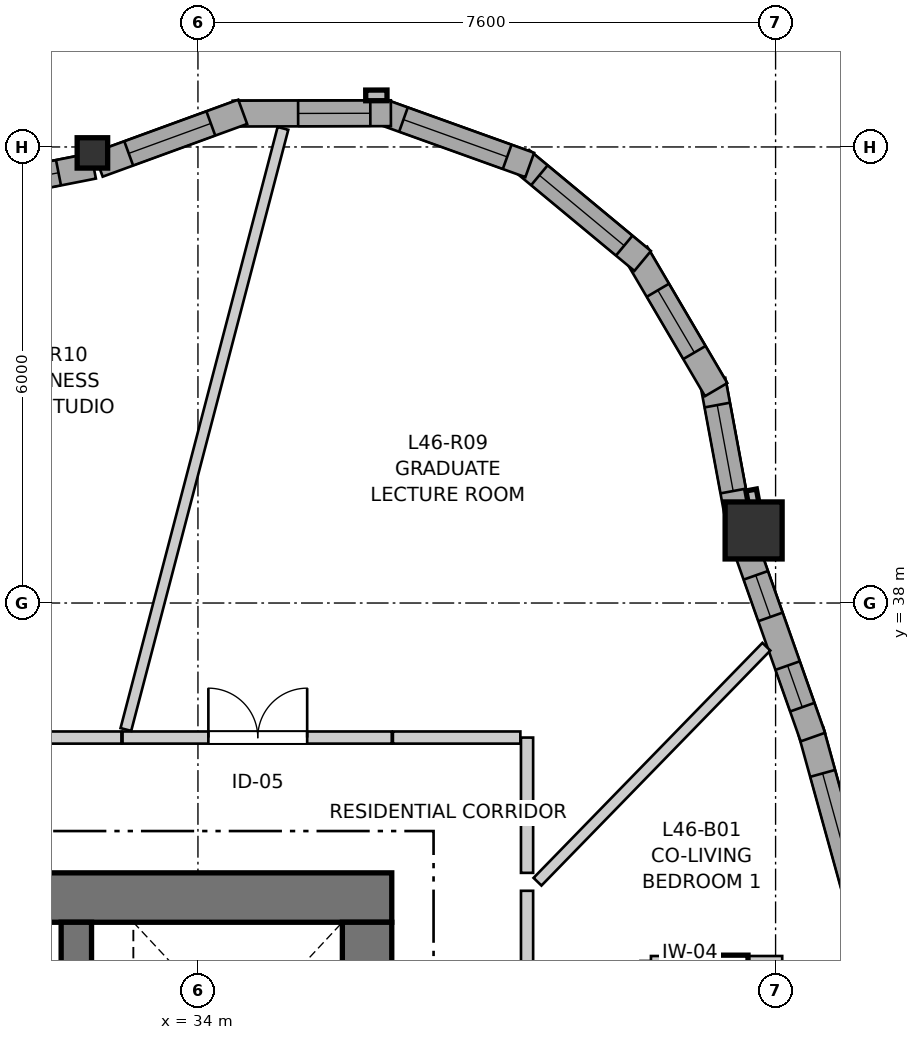
"""IFC4 building model, lengths in metres.
Left out: names, types, materials, properties, quantities, classifications, styles, units other than length and angle.
Written with IfcOpenShell. Run it as: python <this file> out.ifc"""

import sys

from ifc_helpers import new_model, si_unit, direction, frame, frame_2d, origin, origin_2d, place, context, subcontext, project, spatial, rectangle, i_section, extrude, source, transform, mapped, element, fill, save


model = new_model("IFC4")
c1 = context("Model", 3, precision=1e-05, world=origin(), true_north=direction((0.0, 1.0)))
c2 = subcontext(c1, "Body", "Model", "MODEL_VIEW")
j1 = project(units=[si_unit("LENGTHUNIT", "METRE"), si_unit("PLANEANGLEUNIT", "RADIAN")], contexts=[c1])
p1 = place(None, origin())
s1 = spatial("IfcSite", under=j1, at=p1, CompositionType="ELEMENT")
p2 = place(p1, origin())
s2 = spatial("IfcBuilding", under=s1, at=p2, CompositionType="ELEMENT")
p3 = place(p2, frame((0.0, 0.0, 155.4)))
s3 = spatial("IfcBuildingStorey", under=s2, at=p3, CompositionType="ELEMENT", Elevation=155.4)
p4 = place(p3, frame((36.55, 34.125, 0.0), z_axis=(0.0, 0.0, 1.0), x_axis=(-1.0, 0.0, 0.0)))
e1 = element("IfcWall", 1, at=p4, inside=s3, PredefinedType="SHEAR", context=c2, shape_type="SweptSolid", body=[
    extrude(rectangle(XDim=12.4, YDim=0.65, at=frame_2d((6.2, 0.0))), origin(), (0.0, 0.0, 1.0), 2.935),
])
p5 = place(p3, frame((36.225, 18.2, 0.0), z_axis=(0.0, 0.0, 1.0), x_axis=(0.0, 1.0, 0.0)))
e2 = element("IfcWall", 2, at=p5, inside=s3, PredefinedType="SHEAR", context=c2, shape_type="SweptSolid", body=[
    extrude(rectangle(XDim=15.6, YDim=0.65, at=frame_2d((7.8, 0.0))), origin(), (0.0, 0.0, 1.0), 2.935),
])
p6 = place(p5, frame((4.25, 0.0, 0.0)))
e3 = element("IfcOpeningElement", 3, at=p6, cuts=e2, PredefinedType="OPENING", context=c2, shape_type="SweptSolid", body=[
    extrude(rectangle(XDim=1.1, YDim=2.15, at=frame_2d((0.55, 1.075))), frame((0.0, 0.335, 0.0), z_axis=(0.0, -1.0, 0.0), x_axis=(1.0, 0.0, 0.0)), (0.0, 0.0, 1.0), 0.67),
])
p7 = place(p5, frame((10.25, 0.0, 0.0)))
e4 = element("IfcOpeningElement", 4, at=p7, cuts=e2, PredefinedType="OPENING", context=c2, shape_type="SweptSolid", body=[
    extrude(rectangle(XDim=1.1, YDim=2.15, at=frame_2d((0.55, 1.075))), frame((0.0, 0.335, 0.0), z_axis=(0.0, -1.0, 0.0), x_axis=(1.0, 0.0, 0.0)), (0.0, 0.0, 1.0), 0.67),
])
p8 = place(p3, frame((32.4, 30.85, 0.0), z_axis=(0.0, 0.0, 1.0), x_axis=(0.0, 1.0, 0.0)))
e5 = element("IfcWall", 5, at=p8, inside=s3, PredefinedType="SHEAR", context=c2, shape_type="SweptSolid", body=[
    extrude(rectangle(XDim=2.95, YDim=0.4, at=frame_2d((1.475, 0.0))), origin(), (0.0, 0.0, 1.0), 2.935),
])
m1 = source(origin(), c2, "Body", "SweptSolid", [
    extrude(rectangle(XDim=0.75, YDim=0.75, at=origin_2d()), origin(), (0.0, 0.0, 1.0), 2.935),
])
p9 = place(p3, frame((41.311, 38.955, 0.0), z_axis=(0.0, 0.0, 1.0), x_axis=(1.0, 0.0, 0.0)))
e6 = element("IfcColumn", 6, at=p9, inside=s3, PredefinedType="COLUMN", context=c2, shape_type="MappedRepresentation", body=[
    mapped(m1, transform((0.0, 0.0, 0.0), x_axis=(1.0, 0.0, 0.0), y_axis=(0.0, 1.0, 0.0), z_axis=(0.0, 0.0, 1.0), scale=1.0)),
])
m2 = source(origin(), c2, "Body", "SweptSolid", [
    extrude(i_section(OverallWidth=0.401, OverallDepth=0.399, WebThickness=0.023, FlangeThickness=0.036, FilletRadius=0.015, at=origin_2d()), origin(), (0.0, 0.0, 1.0), 2.935),
])
p10 = place(p3, frame((32.611, 43.922, 0.0), z_axis=(0.0, 0.0, 1.0), x_axis=(1.0, 0.0, 0.0)))
e7 = element("IfcColumn", 7, at=p10, inside=s3, PredefinedType="PILASTER", context=c2, shape_type="MappedRepresentation", body=[
    mapped(m2, transform((0.0, 0.0, 0.0), x_axis=(1.0, 0.0, 0.0), y_axis=(0.0, 1.0, 0.0), z_axis=(0.0, 0.0, 1.0), scale=1.0)),
])
p11 = place(p3, frame((42.795, 33.674, 0.0), z_axis=(0.0, 0.0, 1.0), x_axis=(-0.266404970566, 0.963861188999, 0.0)))
e8 = element("IfcWall", 8, at=p11, inside=s3, PredefinedType="SOLIDWALL", context=c2, shape_type="SweptSolid", body=[
    extrude(rectangle(XDim=2.745, YDim=0.34, at=frame_2d((1.372, 0.0))), origin(), (0.0, 0.0, 1.0), 2.515),
])
p12 = place(p11, frame((0.562, 0.0, 0.82)))
e9 = element("IfcOpeningElement", 9, at=p12, cuts=e8, PredefinedType="OPENING", context=c2, shape_type="SweptSolid", body=[
    extrude(rectangle(XDim=1.6, YDim=1.35, at=frame_2d((0.8, 0.675))), frame((0.0, 0.18, 0.0), z_axis=(0.0, -1.0, 0.0), x_axis=(1.0, 0.0, 0.0)), (0.0, 0.0, 1.0), 0.36),
])
p13 = place(p3, frame((42.09, 36.236, 0.0), z_axis=(0.0, 0.0, 1.0), x_axis=(-0.332705243691, 0.943030869495, 0.0)))
e10 = element("IfcWall", 10, at=p13, inside=s3, PredefinedType="SOLIDWALL", context=c2, shape_type="SweptSolid", body=[
    extrude(rectangle(XDim=2.668, YDim=0.34, at=frame_2d((1.334, 0.0))), origin(), (0.0, 0.0, 1.0), 2.515),
])
p14 = place(p13, frame((0.417, 0.0, 0.82)))
e11 = element("IfcOpeningElement", 11, at=p14, cuts=e10, PredefinedType="OPENING", context=c2, shape_type="SweptSolid", body=[
    extrude(rectangle(XDim=0.58, YDim=1.35, at=frame_2d((0.29, 0.675))), frame((0.0, 0.18, 0.0), z_axis=(0.0, -1.0, 0.0), x_axis=(1.0, 0.0, 0.0)), (0.0, 0.0, 1.0), 0.36),
])
p15 = place(p13, frame((1.677, 0.0, 0.82)))
e12 = element("IfcOpeningElement", 12, at=p15, cuts=e10, PredefinedType="OPENING", context=c2, shape_type="SweptSolid", body=[
    extrude(rectangle(XDim=0.58, YDim=1.35, at=frame_2d((0.29, 0.675))), frame((0.0, 0.18, 0.0), z_axis=(0.0, -1.0, 0.0), x_axis=(1.0, 0.0, 0.0)), (0.0, 0.0, 1.0), 0.36),
])
p16 = place(p3, frame((41.115, 39.076, 0.0), z_axis=(0.0, 0.0, 1.0), x_axis=(-0.182320770307, 0.983239104549, 0.0)))
e13 = element("IfcWall", 13, at=p16, inside=s3, PredefinedType="SOLIDWALL", context=c2, shape_type="SweptSolid", body=[
    extrude(rectangle(XDim=1.888, YDim=0.34, at=frame_2d((0.944, 0.0))), origin(), (0.0, 0.0, 1.0), 2.515),
])
p17 = place(p16, frame((0.404, 0.0, 0.82)))
e14 = element("IfcOpeningElement", 14, at=p17, cuts=e13, PredefinedType="OPENING", context=c2, shape_type="SweptSolid", body=[
    extrude(rectangle(XDim=1.15, YDim=1.2, at=frame_2d((0.575, 0.6))), frame((0.0, 0.18, 0.0), z_axis=(0.0, -1.0, 0.0), x_axis=(1.0, 0.0, 0.0)), (0.0, 0.0, 1.0), 0.36),
])
p18 = place(p3, frame((40.818, 40.808, 0.0), z_axis=(0.0, 0.0, 1.0), x_axis=(-0.506312473438, 0.86235009088, 0.0)))
e15 = element("IfcWall", 15, at=p18, inside=s3, PredefinedType="SOLIDWALL", context=c2, shape_type="SweptSolid", body=[
    extrude(rectangle(XDim=2.081, YDim=0.34, at=frame_2d((1.041, 0.0))), origin(), (0.0, 0.0, 1.0), 2.515),
])
p19 = place(p18, frame((0.566, 0.0, 0.82)))
e16 = element("IfcOpeningElement", 16, at=p19, cuts=e15, PredefinedType="OPENING", context=c2, shape_type="SweptSolid", body=[
    extrude(rectangle(XDim=0.95, YDim=1.35, at=frame_2d((0.475, 0.675))), frame((0.0, 0.18, 0.0), z_axis=(0.0, -1.0, 0.0), x_axis=(1.0, 0.0, 0.0)), (0.0, 0.0, 1.0), 0.36),
])
p20 = place(p3, frame((39.851, 42.5, 0.0), z_axis=(0.0, 0.0, 1.0), x_axis=(-0.769642650648, 0.638474894028, 0.0)))
e17 = element("IfcWall", 17, at=p20, inside=s3, PredefinedType="SOLIDWALL", context=c2, shape_type="SweptSolid", body=[
    extrude(rectangle(XDim=2.081, YDim=0.34, at=frame_2d((1.041, 0.0))), origin(), (0.0, 0.0, 1.0), 2.515),
])
p21 = place(p20, frame((0.315, 0.0, 0.82)))
e18 = element("IfcOpeningElement", 18, at=p21, cuts=e17, PredefinedType="OPENING", context=c2, shape_type="SweptSolid", body=[
    extrude(rectangle(XDim=1.45, YDim=1.25, at=frame_2d((0.725, 0.625))), frame((0.0, 0.18, 0.0), z_axis=(0.0, -1.0, 0.0), x_axis=(1.0, 0.0, 0.0)), (0.0, 0.0, 1.0), 0.36),
])
p22 = place(p3, frame((38.365, 43.763, 0.0), z_axis=(0.0, 0.0, 1.0), x_axis=(-0.941071215914, 0.338208466153, 0.0)))
e19 = element("IfcWall", 19, at=p22, inside=s3, PredefinedType="SOLIDWALL", context=c2, shape_type="SweptSolid", body=[
    extrude(rectangle(XDim=2.081, YDim=0.34, at=frame_2d((1.041, 0.0))), origin(), (0.0, 0.0, 1.0), 2.515),
])
p23 = place(p22, frame((0.316, 0.0, 0.82)))
e20 = element("IfcOpeningElement", 20, at=p23, cuts=e19, PredefinedType="OPENING", context=c2, shape_type="SweptSolid", body=[
    extrude(rectangle(XDim=1.45, YDim=1.25, at=frame_2d((0.725, 0.625))), frame((0.0, 0.18, 0.0), z_axis=(0.0, -1.0, 0.0), x_axis=(1.0, 0.0, 0.0)), (0.0, 0.0, 1.0), 0.36),
])
p24 = place(p3, frame((36.538, 44.444, 0.0), z_axis=(0.0, 0.0, 1.0), x_axis=(-0.999997247411, -0.002346309825, 0.0)))
e21 = element("IfcWall", 21, at=p24, inside=s3, PredefinedType="SOLIDWALL", context=c2, shape_type="SweptSolid", body=[
    extrude(rectangle(XDim=2.081, YDim=0.34, at=frame_2d((1.041, 0.0))), origin(), (0.0, 0.0, 1.0), 2.515),
])
p25 = place(p24, frame((0.271, 0.0, 0.82)))
e22 = element("IfcOpeningElement", 22, at=p25, cuts=e21, PredefinedType="OPENING", context=c2, shape_type="SweptSolid", body=[
    extrude(rectangle(XDim=0.95, YDim=1.35, at=frame_2d((0.475, 0.675))), frame((0.0, 0.18, 0.0), z_axis=(0.0, -1.0, 0.0), x_axis=(1.0, 0.0, 0.0)), (0.0, 0.0, 1.0), 0.36),
])
p26 = place(p3, frame((34.589, 44.462, 0.0), z_axis=(0.0, 0.0, 1.0), x_axis=(-0.939387553708, -0.342857148007, 0.0)))
e23 = element("IfcWall", 23, at=p26, inside=s3, PredefinedType="SOLIDWALL", context=c2, shape_type="SweptSolid", body=[
    extrude(rectangle(XDim=2.023, YDim=0.34, at=frame_2d((1.011, 0.0))), origin(), (0.0, 0.0, 1.0), 2.515),
])
p27 = place(p26, frame((0.447, 0.0, 0.82)))
e24 = element("IfcOpeningElement", 24, at=p27, cuts=e23, PredefinedType="OPENING", context=c2, shape_type="SweptSolid", body=[
    extrude(rectangle(XDim=1.15, YDim=1.2, at=frame_2d((0.575, 0.6))), frame((0.0, 0.18, 0.0), z_axis=(0.0, -1.0, 0.0), x_axis=(1.0, 0.0, 0.0)), (0.0, 0.0, 1.0), 0.36),
])
p28 = place(p3, frame((32.625, 43.751, 0.0), z_axis=(0.0, 0.0, 1.0), x_axis=(-0.981232663103, -0.192827541756, 0.0)))
e25 = element("IfcWall", 25, at=p28, inside=s3, PredefinedType="SOLIDWALL", context=c2, shape_type="SweptSolid", body=[
    extrude(rectangle(XDim=2.756, YDim=0.34, at=frame_2d((1.378, 0.0))), origin(), (0.0, 0.0, 1.0), 2.515),
])
p29 = place(p28, frame((0.468, 0.0, 0.82)))
e26 = element("IfcOpeningElement", 26, at=p29, cuts=e25, PredefinedType="OPENING", context=c2, shape_type="SweptSolid", body=[
    extrude(rectangle(XDim=1.8, YDim=1.45, at=frame_2d((0.9, 0.725))), frame((0.0, 0.18, 0.0), z_axis=(0.0, -1.0, 0.0), x_axis=(1.0, 0.0, 0.0)), (0.0, 0.0, 1.0), 0.36),
])
p30 = place(p3, frame((38.33, 34.214, 0.0), z_axis=(0.0, 0.0, 1.0), x_axis=(0.0, -1.0, 0.0)))
e27 = element("IfcWall", 27, at=p30, inside=s3, PredefinedType="PARTITIONING", context=c2, shape_type="SweptSolid", body=[
    extrude(rectangle(XDim=4.093, YDim=0.16, at=frame_2d((2.046, 0.0))), origin(), (0.0, 0.0, 1.0), 2.935),
])
p31 = place(p30, frame((1.589, 0.0, 0.0)))
e28 = element("IfcOpeningElement", 28, at=p31, cuts=e27, PredefinedType="OPENING", context=c2, shape_type="SweptSolid", body=[
    extrude(rectangle(XDim=0.92, YDim=2.1, at=frame_2d((0.46, 1.05))), frame((0.0, 0.09, 0.0), z_axis=(0.0, -1.0, 0.0), x_axis=(1.0, 0.0, 0.0)), (0.0, 0.0, 1.0), 0.18),
])
p32 = place(p3, frame((33.008, 36.23, 0.0), z_axis=(0.0, 0.0, 1.0), x_axis=(1.0, 0.0, 0.0)))
e29 = element("IfcWall", 29, at=p32, inside=s3, PredefinedType="PARTITIONING", context=c2, shape_type="SweptSolid", body=[
    extrude(rectangle(XDim=3.542, YDim=0.16, at=frame_2d((1.771, 0.0))), origin(), (0.0, 0.0, 1.0), 2.573),
])
p33 = place(p32, frame((1.129, 0.0, 0.0)))
e30 = element("IfcOpeningElement", 30, at=p33, cuts=e29, PredefinedType="OPENING", context=c2, shape_type="SweptSolid", body=[
    extrude(rectangle(XDim=1.3, YDim=2.1, at=frame_2d((0.65, 1.05))), frame((0.0, 0.09, 0.0), z_axis=(0.0, -1.0, 0.0), x_axis=(1.0, 0.0, 0.0)), (0.0, 0.0, 1.0), 0.18),
])
p34 = place(p3, frame((30.055, 36.23, 0.0), z_axis=(0.0, 0.0, 1.0), x_axis=(1.0, 0.0, 0.0)))
e31 = element("IfcWall", 31, at=p34, inside=s3, PredefinedType="PARTITIONING", context=c2, shape_type="SweptSolid", body=[
    extrude(rectangle(XDim=2.938, YDim=0.16, at=frame_2d((1.469, 0.0))), origin(), (0.0, 0.0, 1.0), 2.573),
])
p35 = place(p34, frame((0.99, 0.0, 0.0)))
e32 = element("IfcOpeningElement", 32, at=p35, cuts=e31, PredefinedType="OPENING", context=c2, shape_type="SweptSolid", body=[
    extrude(rectangle(XDim=0.96, YDim=2.1, at=frame_2d((0.48, 1.05))), frame((0.0, 0.09, 0.0), z_axis=(0.0, -1.0, 0.0), x_axis=(1.0, 0.0, 0.0)), (0.0, 0.0, 1.0), 0.18),
])
p36 = place(p3, frame((39.887, 33.291, 0.0), z_axis=(0.0, 0.0, 1.0), x_axis=(0.0, -1.0, 0.0)))
e33 = element("IfcWall", 33, at=p36, inside=s3, PredefinedType="PARTITIONING", context=c2, shape_type="SweptSolid", body=[
    extrude(rectangle(XDim=1.9, YDim=0.13, at=frame_2d((0.95, 0.0))), origin(), (0.0, 0.0, 1.0), 2.935),
])
p37 = place(p36, frame((0.51, 0.0, 0.0)))
e34 = element("IfcOpeningElement", 34, at=p37, cuts=e33, PredefinedType="OPENING", context=c2, shape_type="SweptSolid", body=[
    extrude(rectangle(XDim=0.88, YDim=2.05, at=frame_2d((0.44, 1.025))), frame((0.0, 0.075, 0.0), z_axis=(0.0, -1.0, 0.0), x_axis=(1.0, 0.0, 0.0)), (0.0, 0.0, 1.0), 0.15),
])
p38 = place(p3, frame((33.052, 36.336, 0.0), z_axis=(0.0, 0.0, 1.0), x_axis=(0.252838925964, 0.967508386277, 0.0)))
e35 = element("IfcWall", 35, at=p38, inside=s3, PredefinedType="PARTITIONING", context=c2, shape_type="SweptSolid", body=[
    extrude(rectangle(XDim=8.174, YDim=0.145, at=frame_2d((4.087, 0.0))), origin(), (0.0, 0.0, 1.0), 2.935),
])
p39 = place(p3, frame((38.468, 34.333, 0.0), z_axis=(0.0, 0.0, 1.0), x_axis=(0.697683159601, 0.71640645503, 0.0)))
e36 = element("IfcWall", 36, at=p39, inside=s3, PredefinedType="PARTITIONING", context=c2, shape_type="SweptSolid", body=[
    extrude(rectangle(XDim=4.316, YDim=0.145, at=frame_2d((2.158, 0.0))), origin(), (0.0, 0.0, 1.0), 2.935),
])
p40 = place(p3, frame((39.96, 33.291, 0.0), z_axis=(0.0, 0.0, 1.0), x_axis=(1.0, 0.0, 0.0)))
e37 = element("IfcWall", 37, at=p40, inside=s3, PredefinedType="PARTITIONING", context=c2, shape_type="SweptSolid", body=[
    extrude(rectangle(XDim=1.727, YDim=0.13, at=frame_2d((0.864, 0.0))), origin(), (0.0, 0.0, 1.0), 2.935),
])
p41 = place(p3, frame((38.33, 34.45, 0.0), z_axis=(0.0, 0.0, 1.0), x_axis=(0.0, 1.0, 0.0)))
e38 = element("IfcWall", 38, at=p41, inside=s3, PredefinedType="PARTITIONING", context=c2, shape_type="SweptSolid", body=[
    extrude(rectangle(XDim=1.78, YDim=0.16, at=frame_2d((0.89, 0.0))), origin(), (0.0, 0.0, 1.0), 2.935),
])
p42 = place(p3, frame((36.565, 36.23, 0.0), z_axis=(0.0, 0.0, 1.0), x_axis=(1.0, 0.0, 0.0)))
e39 = element("IfcWall", 39, at=p42, inside=s3, PredefinedType="PARTITIONING", context=c2, shape_type="SweptSolid", body=[
    extrude(rectangle(XDim=1.677, YDim=0.16, at=frame_2d((0.838, 0.0))), origin(), (0.0, 0.0, 1.0), 2.935),
])
m3 = source(origin(), c2, "Body", "SweptSolid", [
    extrude(rectangle(XDim=1.6, YDim=1.35, at=frame_2d((0.8, 0.675))), frame((0.0, 0.03, 0.0), z_axis=(0.0, -1.0, 0.0), x_axis=(1.0, 0.0, 0.0)), (0.0, 0.0, 1.0), 0.06),
])
p43 = place(p12, origin())
e40 = element("IfcWindow", 40, at=p43, inside=s3, PartitioningType="SINGLE_PANEL", PredefinedType="WINDOW", context=c2, shape_type="MappedRepresentation", body=[
    mapped(m3, transform((0.0, 0.0, 0.0), x_axis=(1.0, 0.0, 0.0), y_axis=(0.0, 1.0, 0.0), z_axis=(0.0, 0.0, 1.0), scale=1.0)),
])
fill(e9, e40)
m4 = source(origin(), c2, "Body", "SweptSolid", [
    extrude(rectangle(XDim=0.58, YDim=1.35, at=frame_2d((0.29, 0.675))), frame((0.0, 0.03, 0.0), z_axis=(0.0, -1.0, 0.0), x_axis=(1.0, 0.0, 0.0)), (0.0, 0.0, 1.0), 0.06),
])
p44 = place(p14, origin())
e41 = element("IfcWindow", 41, at=p44, inside=s3, PartitioningType="SINGLE_PANEL", PredefinedType="WINDOW", context=c2, shape_type="MappedRepresentation", body=[
    mapped(m4, transform((0.0, 0.0, 0.0), x_axis=(1.0, 0.0, 0.0), y_axis=(0.0, 1.0, 0.0), z_axis=(0.0, 0.0, 1.0), scale=1.0)),
])
fill(e11, e41)
p45 = place(p15, origin())
e42 = element("IfcWindow", 42, at=p45, inside=s3, PartitioningType="SINGLE_PANEL", PredefinedType="WINDOW", context=c2, shape_type="MappedRepresentation", body=[
    mapped(m4, transform((0.0, 0.0, 0.0), x_axis=(1.0, 0.0, 0.0), y_axis=(0.0, 1.0, 0.0), z_axis=(0.0, 0.0, 1.0), scale=1.0)),
])
fill(e12, e42)
m5 = source(origin(), c2, "Body", "SweptSolid", [
    extrude(rectangle(XDim=1.15, YDim=1.2, at=frame_2d((0.575, 0.6))), frame((0.0, 0.03, 0.0), z_axis=(0.0, -1.0, 0.0), x_axis=(1.0, 0.0, 0.0)), (0.0, 0.0, 1.0), 0.06),
])
p46 = place(p17, origin())
e43 = element("IfcWindow", 43, at=p46, inside=s3, PartitioningType="SINGLE_PANEL", PredefinedType="WINDOW", context=c2, shape_type="MappedRepresentation", body=[
    mapped(m5, transform((0.0, 0.0, 0.0), x_axis=(1.0, 0.0, 0.0), y_axis=(0.0, 1.0, 0.0), z_axis=(0.0, 0.0, 1.0), scale=1.0)),
])
fill(e14, e43)
m6 = source(origin(), c2, "Body", "SweptSolid", [
    extrude(rectangle(XDim=0.95, YDim=1.35, at=frame_2d((0.475, 0.675))), frame((0.0, 0.03, 0.0), z_axis=(0.0, -1.0, 0.0), x_axis=(1.0, 0.0, 0.0)), (0.0, 0.0, 1.0), 0.06),
])
p47 = place(p19, origin())
e44 = element("IfcWindow", 44, at=p47, inside=s3, PartitioningType="SINGLE_PANEL", PredefinedType="WINDOW", context=c2, shape_type="MappedRepresentation", body=[
    mapped(m6, transform((0.0, 0.0, 0.0), x_axis=(1.0, 0.0, 0.0), y_axis=(0.0, 1.0, 0.0), z_axis=(0.0, 0.0, 1.0), scale=1.0)),
])
fill(e16, e44)
m7 = source(origin(), c2, "Body", "SweptSolid", [
    extrude(rectangle(XDim=1.45, YDim=1.25, at=frame_2d((0.725, 0.625))), frame((0.0, 0.03, 0.0), z_axis=(0.0, -1.0, 0.0), x_axis=(1.0, 0.0, 0.0)), (0.0, 0.0, 1.0), 0.06),
])
p48 = place(p21, origin())
e45 = element("IfcWindow", 45, at=p48, inside=s3, PartitioningType="SINGLE_PANEL", PredefinedType="WINDOW", context=c2, shape_type="MappedRepresentation", body=[
    mapped(m7, transform((0.0, 0.0, 0.0), x_axis=(1.0, 0.0, 0.0), y_axis=(0.0, 1.0, 0.0), z_axis=(0.0, 0.0, 1.0), scale=1.0)),
])
fill(e18, e45)
p49 = place(p23, origin())
e46 = element("IfcWindow", 46, at=p49, inside=s3, PartitioningType="SINGLE_PANEL", PredefinedType="WINDOW", context=c2, shape_type="MappedRepresentation", body=[
    mapped(m7, transform((0.0, 0.0, 0.0), x_axis=(1.0, 0.0, 0.0), y_axis=(0.0, 1.0, 0.0), z_axis=(0.0, 0.0, 1.0), scale=1.0)),
])
fill(e20, e46)
p50 = place(p25, origin())
e47 = element("IfcWindow", 47, at=p50, inside=s3, PartitioningType="SINGLE_PANEL", PredefinedType="WINDOW", context=c2, shape_type="MappedRepresentation", body=[
    mapped(m6, transform((0.0, 0.0, 0.0), x_axis=(1.0, 0.0, 0.0), y_axis=(0.0, 1.0, 0.0), z_axis=(0.0, 0.0, 1.0), scale=1.0)),
])
fill(e22, e47)
p51 = place(p27, origin())
e48 = element("IfcWindow", 48, at=p51, inside=s3, PartitioningType="SINGLE_PANEL", PredefinedType="WINDOW", context=c2, shape_type="MappedRepresentation", body=[
    mapped(m5, transform((0.0, 0.0, 0.0), x_axis=(1.0, 0.0, 0.0), y_axis=(0.0, 1.0, 0.0), z_axis=(0.0, 0.0, 1.0), scale=1.0)),
])
fill(e24, e48)
m8 = source(origin(), c2, "Body", "SweptSolid", [
    extrude(rectangle(XDim=1.8, YDim=1.45, at=frame_2d((0.9, 0.725))), frame((0.0, 0.03, 0.0), z_axis=(0.0, -1.0, 0.0), x_axis=(1.0, 0.0, 0.0)), (0.0, 0.0, 1.0), 0.06),
])
p52 = place(p29, origin())
e49 = element("IfcWindow", 49, at=p52, inside=s3, PartitioningType="SINGLE_PANEL", PredefinedType="WINDOW", context=c2, shape_type="MappedRepresentation", body=[
    mapped(m8, transform((0.0, 0.0, 0.0), x_axis=(1.0, 0.0, 0.0), y_axis=(0.0, 1.0, 0.0), z_axis=(0.0, 0.0, 1.0), scale=1.0)),
])
fill(e26, e49)
m9 = source(origin(), c2, "Body", "SweptSolid", [
    extrude(rectangle(XDim=1.3, YDim=2.1, at=frame_2d((0.65, 1.05))), frame((0.0, 0.025, 0.0), z_axis=(0.0, -1.0, 0.0), x_axis=(1.0, 0.0, 0.0)), (0.0, 0.0, 1.0), 0.05),
])
p53 = place(p33, origin())
e50 = element("IfcDoor", 50, at=p53, inside=s3, OperationType="DOUBLE_DOOR_SINGLE_SWING", PredefinedType="DOOR", context=c2, shape_type="MappedRepresentation", body=[
    mapped(m9, transform((0.0, 0.0, 0.0), x_axis=(1.0, 0.0, 0.0), y_axis=(0.0, 1.0, 0.0), z_axis=(0.0, 0.0, 1.0), scale=1.0)),
])
fill(e30, e50)
save(model, sys.argv[1])
